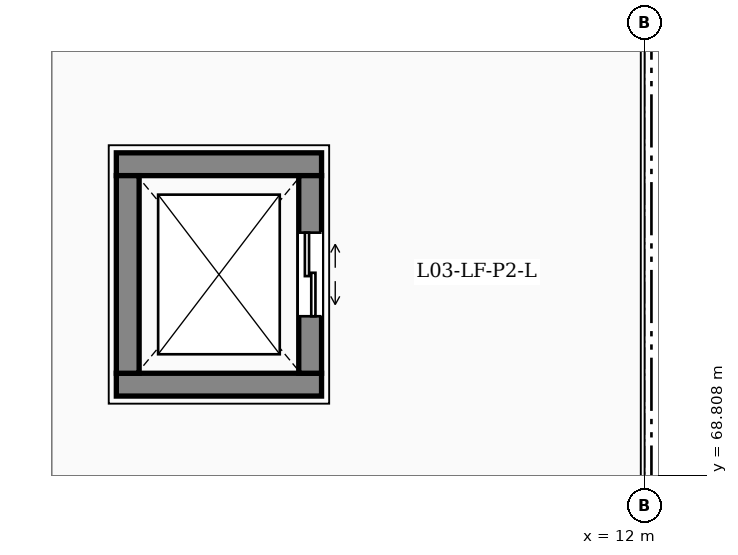
"""IFC4 building model, lengths in metres.
Left out: names, types, materials, properties, quantities, classifications, styles, units other than length and angle.
Written with IfcOpenShell. Run it as: python <this file> out.ifc"""

import sys

from ifc_helpers import new_model, si_unit, direction, frame, frame_2d, origin, place, context, subcontext, project, spatial, rectangle, extrude, element, fill, save


model = new_model("IFC4")
c1 = context("Model", 3, precision=1e-05, world=origin(), true_north=direction((0.0, 1.0)))
c2 = subcontext(c1, "Body", "Model", "MODEL_VIEW")
j1 = project(units=[si_unit("LENGTHUNIT", "METRE"), si_unit("PLANEANGLEUNIT", "RADIAN")], contexts=[c1])
p1 = place(None, origin())
s1 = spatial("IfcSite", under=j1, at=p1, CompositionType="ELEMENT")
p2 = place(p1, origin())
s2 = spatial("IfcBuilding", under=s1, at=p2, CompositionType="ELEMENT")
p3 = place(p2, frame((0.0, 0.0, 13.8)))
s3 = spatial("IfcBuildingStorey", under=s2, at=p3, CompositionType="ELEMENT", Elevation=13.8)
for number, where, z_axis, x_axis in (
    (1, (5.05, 70.0, 0.0), (0.0, 0.0, 1.0), (1.0, 0.0, 0.0)),
    (2, (7.75, 72.9, 0.0), (0.0, 0.0, 1.0), (-1.0, 0.0, 0.0)),
):
    element("IfcWall", number, at=place(p3, frame(where, z_axis=z_axis, x_axis=x_axis)), inside=s3, PredefinedType="SHEAR", context=c2, shape_type="SweptSolid", body=[
        extrude(rectangle(XDim=2.7, YDim=0.3, at=frame_2d((1.35, 0.0))), origin(), (0.0, 0.0, 1.0), 4.25),
    ])
p4 = place(p3, frame((5.2, 70.15, 0.0), z_axis=(0.0, 0.0, 1.0), x_axis=(0.0, 1.0, 0.0)))
e3 = element("IfcWall", 3, at=p4, inside=s3, PredefinedType="SHEAR", context=c2, shape_type="SweptSolid", body=[
    extrude(rectangle(XDim=2.6, YDim=0.3, at=frame_2d((1.3, 0.0))), origin(), (0.0, 0.0, 1.0), 4.25),
])
p5 = place(p3, frame((7.6, 72.75, 0.0), z_axis=(0.0, 0.0, 1.0), x_axis=(0.0, -1.0, 0.0)))
e4 = element("IfcWall", 4, at=p5, inside=s3, PredefinedType="SHEAR", context=c2, shape_type="SweptSolid", body=[
    extrude(rectangle(XDim=2.6, YDim=0.3, at=frame_2d((1.3, 0.0))), origin(), (0.0, 0.0, 1.0), 4.25),
])
p6 = place(p5, frame((0.75, 0.0, 0.0)))
e5 = element("IfcOpeningElement", 5, at=p6, cuts=e4, PredefinedType="OPENING", context=c2, shape_type="SweptSolid", body=[
    extrude(rectangle(XDim=1.1, YDim=2.15, at=frame_2d((0.55, 1.075))), frame((0.0, 0.16, 0.0), z_axis=(0.0, -1.0, 0.0), x_axis=(1.0, 0.0, 0.0)), (0.0, 0.0, 1.0), 0.32),
])
p7 = place(p6, origin())
e6 = element("IfcDoor", 6, at=p7, inside=s3, OperationType="DOUBLE_DOOR_SLIDING", PredefinedType="DOOR", context=c2, shape_type="SweptSolid", body=[
    extrude(rectangle(XDim=1.1, YDim=2.15, at=frame_2d((0.55, 1.075))), frame((0.0, 0.025, 0.0), z_axis=(0.0, -1.0, 0.0), x_axis=(1.0, 0.0, 0.0)), (0.0, 0.0, 1.0), 0.05),
])
fill(e5, e6)
save(model, sys.argv[1])
